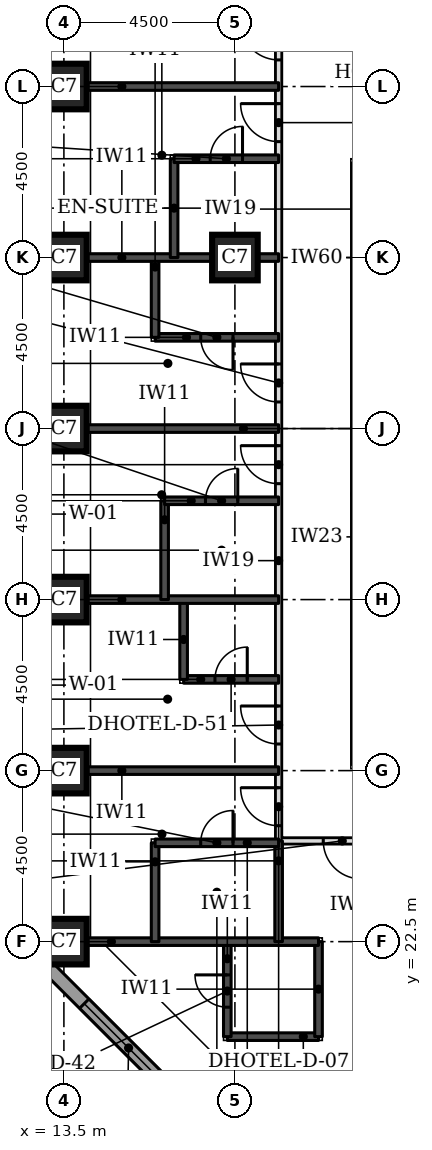
"""IFC4 building model, lengths in metres.
Left out: names, types, materials, properties, quantities, classifications, styles, units other than length and angle.
Written with IfcOpenShell. Run it as: python <this file> out.ifc"""

import sys

from ifc_helpers import new_model, si_unit, direction, frame, frame_2d, origin, origin_2d, place, context, subcontext, project, spatial, rectangle, extrude, element, fill, save


model = new_model("IFC4")
c1 = context("Model", 3, precision=1e-05, world=origin(), true_north=direction((0.0, 1.0)))
c2 = subcontext(c1, "Body", "Model", "MODEL_VIEW")
j1 = project(units=[si_unit("LENGTHUNIT", "METRE"), si_unit("PLANEANGLEUNIT", "RADIAN")], contexts=[c1])
p1 = place(None, origin())
s1 = spatial("IfcSite", under=j1, at=p1, CompositionType="ELEMENT")
p2 = place(p1, origin())
s2 = spatial("IfcBuilding", under=s1, at=p2, CompositionType="ELEMENT")
p3 = place(p2, frame((0.0, 0.0, 36.3)))
s3 = spatial("IfcBuildingStorey", under=s2, at=p3, CompositionType="ELEMENT", Elevation=36.3)
for number, where, z_axis, x_axis in (
    (1, (13.5, 22.5, 0.0), (0.0, 0.0, 1.0), (1.0, 0.0, 0.0)),
    (2, (13.5, 27.0, 0.0), (0.0, 0.0, 1.0), (1.0, 0.0, 0.0)),
    (3, (13.5, 31.5, 0.0), (0.0, 0.0, 1.0), (1.0, 0.0, 0.0)),
    (4, (13.5, 36.0, 0.0), (0.0, 0.0, 1.0), (1.0, 0.0, 0.0)),
    (5, (13.5, 40.5, 0.0), (0.0, 0.0, 1.0), (1.0, 0.0, 0.0)),
    (6, (18.0, 40.5, 0.0), (0.0, 0.0, 1.0), (1.0, 0.0, 0.0)),
    (7, (13.5, 45.0, 0.0), (0.0, 0.0, 1.0), (1.0, 0.0, 0.0)),
):
    element("IfcColumn", number, at=place(p3, frame(where, z_axis=z_axis, x_axis=x_axis)), inside=s3, PredefinedType="COLUMN", context=c2, shape_type="SweptSolid", body=[
        extrude(rectangle(XDim=1.2, YDim=1.2, at=origin_2d()), origin(), (0.0, 0.0, 1.0), 3.3),
    ])
p4 = place(p3, frame((12.674, 22.23, 0.0), z_axis=(0.0, 0.0, 1.0), x_axis=(0.707106781187, -0.707106781187, 0.0)))
e8 = element("IfcWall", 8, at=p4, inside=s3, PredefinedType="STANDARD", context=c2, shape_type="SweptSolid", body=[
    extrude(rectangle(XDim=7.151, YDim=0.35, at=frame_2d((3.576, 0.0))), origin(), (0.0, 0.0, 1.0), 3.055),
])
p5 = place(p4, frame((1.926, 0.0, 0.8)))
e9 = element("IfcOpeningElement", 9, at=p5, cuts=e8, PredefinedType="OPENING", context=c2, shape_type="SweptSolid", body=[
    extrude(rectangle(XDim=3.3, YDim=1.5, at=frame_2d((1.65, 0.75))), frame((0.0, 0.185, 0.0), z_axis=(0.0, -1.0, 0.0), x_axis=(1.0, 0.0, 0.0)), (0.0, 0.0, 1.0), 0.37),
])
p6 = place(p3, frame((19.15, 25.15, 0.0), z_axis=(0.0, 0.0, 1.0), x_axis=(1.0, 0.0, 0.0)))
e10 = element("IfcWall", 10, at=p6, inside=s3, PredefinedType="PARTITIONING", context=c2, shape_type="SweptSolid", body=[
    extrude(rectangle(XDim=32.35, YDim=0.15, at=frame_2d((16.175, 0.0))), origin(), (0.0, 0.0, 1.0), 3.08),
])
p7 = place(p6, frame((6.4, 0.0, 0.0)))
e11 = element("IfcOpeningElement", 11, at=p7, cuts=e10, PredefinedType="OPENING", context=c2, shape_type="SweptSolid", body=[
    extrude(rectangle(XDim=1.0, YDim=2.1, at=frame_2d((0.5, 1.05))), frame((0.0, 0.085, 0.0), z_axis=(0.0, -1.0, 0.0), x_axis=(1.0, 0.0, 0.0)), (0.0, 0.0, 1.0), 0.17),
])
p8 = place(p6, frame((10.5, 0.0, 0.0)))
e12 = element("IfcOpeningElement", 12, at=p8, cuts=e10, PredefinedType="OPENING", context=c2, shape_type="SweptSolid", body=[
    extrude(rectangle(XDim=1.0, YDim=2.1, at=frame_2d((0.5, 1.05))), frame((0.0, 0.085, 0.0), z_axis=(0.0, -1.0, 0.0), x_axis=(1.0, 0.0, 0.0)), (0.0, 0.0, 1.0), 0.17),
])
p9 = place(p6, frame((22.45, 0.0, 0.0)))
e13 = element("IfcOpeningElement", 13, at=p9, cuts=e10, PredefinedType="OPENING", context=c2, shape_type="SweptSolid", body=[
    extrude(rectangle(XDim=1.0, YDim=2.1, at=frame_2d((0.5, 1.05))), frame((0.0, 0.085, 0.0), z_axis=(0.0, -1.0, 0.0), x_axis=(1.0, 0.0, 0.0)), (0.0, 0.0, 1.0), 0.17),
])
p10 = place(p6, frame((26.55, 0.0, 0.0)))
e14 = element("IfcOpeningElement", 14, at=p10, cuts=e10, PredefinedType="OPENING", context=c2, shape_type="SweptSolid", body=[
    extrude(rectangle(XDim=1.0, YDim=2.1, at=frame_2d((0.5, 1.05))), frame((0.0, 0.085, 0.0), z_axis=(0.0, -1.0, 0.0), x_axis=(1.0, 0.0, 0.0)), (0.0, 0.0, 1.0), 0.17),
])
p11 = place(p6, frame((1.175, 0.0, 0.0)))
e15 = element("IfcOpeningElement", 15, at=p11, cuts=e10, PredefinedType="OPENING", context=c2, shape_type="SweptSolid", body=[
    extrude(rectangle(XDim=1.0, YDim=2.1, at=frame_2d((0.5, 1.05))), frame((0.0, 0.085, 0.0), z_axis=(0.0, -1.0, 0.0), x_axis=(1.0, 0.0, 0.0)), (0.0, 0.0, 1.0), 0.17),
])
p12 = place(p6, frame((30.85, 0.0, 0.0)))
e16 = element("IfcOpeningElement", 16, at=p12, cuts=e10, PredefinedType="OPENING", context=c2, shape_type="SweptSolid", body=[
    extrude(rectangle(XDim=1.0, YDim=2.1, at=frame_2d((0.5, 1.05))), frame((0.0, 0.085, 0.0), z_axis=(0.0, -1.0, 0.0), x_axis=(1.0, 0.0, 0.0)), (0.0, 0.0, 1.0), 0.17),
])
p13 = place(p3, frame((19.15, 25.15, 0.0), z_axis=(0.0, 0.0, 1.0), x_axis=(0.0, 1.0, 0.0)))
e17 = element("IfcWall", 17, at=p13, inside=s3, PredefinedType="PARTITIONING", context=c2, shape_type="SweptSolid", body=[
    extrude(rectangle(XDim=24.35, YDim=0.15, at=frame_2d((12.175, 0.0))), origin(), (0.0, 0.0, 1.0), 3.08),
])
p14 = place(p13, frame((0.4, 0.0, 0.0)))
e18 = element("IfcOpeningElement", 18, at=p14, cuts=e17, PredefinedType="OPENING", context=c2, shape_type="SweptSolid", body=[
    extrude(rectangle(XDim=1.0, YDim=2.1, at=frame_2d((0.5, 1.05))), frame((0.0, 0.085, 0.0), z_axis=(0.0, -1.0, 0.0), x_axis=(1.0, 0.0, 0.0)), (0.0, 0.0, 1.0), 0.17),
])
p15 = place(p13, frame((2.55, 0.0, 0.0)))
e19 = element("IfcOpeningElement", 19, at=p15, cuts=e17, PredefinedType="OPENING", context=c2, shape_type="SweptSolid", body=[
    extrude(rectangle(XDim=1.0, YDim=2.1, at=frame_2d((0.5, 1.05))), frame((0.0, 0.085, 0.0), z_axis=(0.0, -1.0, 0.0), x_axis=(1.0, 0.0, 0.0)), (0.0, 0.0, 1.0), 0.17),
])
p16 = place(p13, frame((9.4, 0.0, 0.0)))
e20 = element("IfcOpeningElement", 20, at=p16, cuts=e17, PredefinedType="OPENING", context=c2, shape_type="SweptSolid", body=[
    extrude(rectangle(XDim=1.0, YDim=2.1, at=frame_2d((0.5, 1.05))), frame((0.0, 0.085, 0.0), z_axis=(0.0, -1.0, 0.0), x_axis=(1.0, 0.0, 0.0)), (0.0, 0.0, 1.0), 0.17),
])
p17 = place(p13, frame((11.55, 0.0, 0.0)))
e21 = element("IfcOpeningElement", 21, at=p17, cuts=e17, PredefinedType="OPENING", context=c2, shape_type="SweptSolid", body=[
    extrude(rectangle(XDim=1.0, YDim=2.1, at=frame_2d((0.5, 1.05))), frame((0.0, 0.085, 0.0), z_axis=(0.0, -1.0, 0.0), x_axis=(1.0, 0.0, 0.0)), (0.0, 0.0, 1.0), 0.17),
])
p18 = place(p13, frame((18.4, 0.0, 0.0)))
e22 = element("IfcOpeningElement", 22, at=p18, cuts=e17, PredefinedType="OPENING", context=c2, shape_type="SweptSolid", body=[
    extrude(rectangle(XDim=1.0, YDim=2.1, at=frame_2d((0.5, 1.05))), frame((0.0, 0.085, 0.0), z_axis=(0.0, -1.0, 0.0), x_axis=(1.0, 0.0, 0.0)), (0.0, 0.0, 1.0), 0.17),
])
p19 = place(p13, frame((20.55, 0.0, 0.0)))
e23 = element("IfcOpeningElement", 23, at=p19, cuts=e17, PredefinedType="OPENING", context=c2, shape_type="SweptSolid", body=[
    extrude(rectangle(XDim=1.0, YDim=2.1, at=frame_2d((0.5, 1.05))), frame((0.0, 0.085, 0.0), z_axis=(0.0, -1.0, 0.0), x_axis=(1.0, 0.0, 0.0)), (0.0, 0.0, 1.0), 0.17),
])
p20 = place(p3, frame((21.15, 27.15, 0.0), z_axis=(0.0, 0.0, 1.0), x_axis=(0.0, 1.0, 0.0)))
e24 = element("IfcWall", 24, at=p20, inside=s3, PredefinedType="PARTITIONING", context=c2, shape_type="SweptSolid", body=[
    extrude(rectangle(XDim=15.85, YDim=0.15, at=frame_2d((7.925, 0.0))), origin(), (0.0, 0.0, 1.0), 3.08),
])
p21 = place(p20, frame((2.55, 0.0, 0.0)))
e25 = element("IfcOpeningElement", 25, at=p21, cuts=e24, PredefinedType="OPENING", context=c2, shape_type="SweptSolid", body=[
    extrude(rectangle(XDim=0.9, YDim=2.1, at=frame_2d((0.45, 1.05))), frame((0.0, 0.085, 0.0), z_axis=(0.0, -1.0, 0.0), x_axis=(1.0, 0.0, 0.0)), (0.0, 0.0, 1.0), 0.17),
])
p22 = place(p20, frame((9.225, 0.0, 0.0)))
e26 = element("IfcOpeningElement", 26, at=p22, cuts=e24, PredefinedType="OPENING", context=c2, shape_type="SweptSolid", body=[
    extrude(rectangle(XDim=0.9, YDim=2.1, at=frame_2d((0.45, 1.05))), frame((0.0, 0.085, 0.0), z_axis=(0.0, -1.0, 0.0), x_axis=(1.0, 0.0, 0.0)), (0.0, 0.0, 1.0), 0.17),
])
p23 = place(p3, frame((17.8, 20.0, 0.0), z_axis=(0.0, 0.0, 1.0), x_axis=(1.0, 0.0, 0.0)))
e27 = element("IfcWall", 27, at=p23, inside=s3, PredefinedType="SOLIDWALL", context=c2, shape_type="SweptSolid", body=[
    extrude(rectangle(XDim=2.4, YDim=0.2, at=frame_2d((1.2, 0.0))), origin(), (0.0, 0.0, 1.0), 3.08),
])
p24 = place(p3, frame((17.8, 20.0, 0.0), z_axis=(0.0, 0.0, 1.0), x_axis=(0.0, 1.0, 0.0)))
e28 = element("IfcWall", 28, at=p24, inside=s3, PredefinedType="SOLIDWALL", context=c2, shape_type="SweptSolid", body=[
    extrude(rectangle(XDim=2.5, YDim=0.2, at=frame_2d((1.25, 0.0))), origin(), (0.0, 0.0, 1.0), 3.08),
])
p25 = place(p24, frame((0.775, 0.0, 0.0)))
e29 = element("IfcOpeningElement", 29, at=p25, cuts=e28, PredefinedType="OPENING", context=c2, shape_type="SweptSolid", body=[
    extrude(rectangle(XDim=0.85, YDim=2.1, at=frame_2d((0.425, 1.05))), frame((0.0, 0.11, 0.0), z_axis=(0.0, -1.0, 0.0), x_axis=(1.0, 0.0, 0.0)), (0.0, 0.0, 1.0), 0.22),
])
p26 = place(p3, frame((20.2, 20.0, 0.0), z_axis=(0.0, 0.0, 1.0), x_axis=(0.0, 1.0, 0.0)))
e30 = element("IfcWall", 30, at=p26, inside=s3, PredefinedType="SOLIDWALL", context=c2, shape_type="SweptSolid", body=[
    extrude(rectangle(XDim=2.5, YDim=0.2, at=frame_2d((1.25, 0.0))), origin(), (0.0, 0.0, 1.0), 3.08),
])
p27 = place(p3, frame((14.1, 22.5, 0.0), z_axis=(0.0, 0.0, 1.0), x_axis=(1.0, 0.0, 0.0)))
e31 = element("IfcWall", 31, at=p27, inside=s3, PredefinedType="SOLIDWALL", context=c2, shape_type="SweptSolid", body=[
    extrude(rectangle(XDim=6.1, YDim=0.2, at=frame_2d((3.05, 0.0))), origin(), (0.0, 0.0, 1.0), 3.08),
])
p28 = place(p3, frame((15.9, 22.5, 0.0), z_axis=(0.0, 0.0, 1.0), x_axis=(0.0, 1.0, 0.0)))
e32 = element("IfcWall", 32, at=p28, inside=s3, PredefinedType="SOLIDWALL", context=c2, shape_type="SweptSolid", body=[
    extrude(rectangle(XDim=2.6, YDim=0.2, at=frame_2d((1.3, 0.0))), origin(), (0.0, 0.0, 1.0), 3.08),
])
p29 = place(p3, frame((19.15, 22.5, 0.0), z_axis=(0.0, 0.0, 1.0), x_axis=(0.0, 1.0, 0.0)))
e33 = element("IfcWall", 33, at=p29, inside=s3, PredefinedType="SOLIDWALL", context=c2, shape_type="SweptSolid", body=[
    extrude(rectangle(XDim=2.65, YDim=0.2, at=frame_2d((1.325, 0.0))), origin(), (0.0, 0.0, 1.0), 3.08),
])
p30 = place(p3, frame((15.9, 25.1, 0.0), z_axis=(0.0, 0.0, 1.0), x_axis=(1.0, 0.0, 0.0)))
e34 = element("IfcWall", 34, at=p30, inside=s3, PredefinedType="SOLIDWALL", context=c2, shape_type="SweptSolid", body=[
    extrude(rectangle(XDim=3.25, YDim=0.2, at=frame_2d((1.625, 0.0))), origin(), (0.0, 0.0, 1.0), 3.08),
])
p31 = place(p30, frame((1.2, 0.0, 0.0)))
e35 = element("IfcOpeningElement", 35, at=p31, cuts=e34, PredefinedType="OPENING", context=c2, shape_type="SweptSolid", body=[
    extrude(rectangle(XDim=0.85, YDim=2.1, at=frame_2d((0.425, 1.05))), frame((0.0, 0.11, 0.0), z_axis=(0.0, -1.0, 0.0), x_axis=(1.0, 0.0, 0.0)), (0.0, 0.0, 1.0), 0.22),
])
p32 = place(p3, frame((14.1, 27.0, 0.0), z_axis=(0.0, 0.0, 1.0), x_axis=(1.0, 0.0, 0.0)))
e36 = element("IfcWall", 36, at=p32, inside=s3, PredefinedType="SOLIDWALL", context=c2, shape_type="SweptSolid", body=[
    extrude(rectangle(XDim=5.05, YDim=0.2, at=frame_2d((2.525, 0.0))), origin(), (0.0, 0.0, 1.0), 3.08),
])
p33 = place(p3, frame((16.65, 29.4, 0.0), z_axis=(0.0, 0.0, 1.0), x_axis=(1.0, 0.0, 0.0)))
e37 = element("IfcWall", 37, at=p33, inside=s3, PredefinedType="SOLIDWALL", context=c2, shape_type="SweptSolid", body=[
    extrude(rectangle(XDim=2.5, YDim=0.2, at=frame_2d((1.25, 0.0))), origin(), (0.0, 0.0, 1.0), 3.08),
])
p34 = place(p33, frame((0.825, 0.0, 0.0)))
e38 = element("IfcOpeningElement", 38, at=p34, cuts=e37, PredefinedType="OPENING", context=c2, shape_type="SweptSolid", body=[
    extrude(rectangle(XDim=0.85, YDim=2.1, at=frame_2d((0.425, 1.05))), frame((0.0, 0.11, 0.0), z_axis=(0.0, -1.0, 0.0), x_axis=(1.0, 0.0, 0.0)), (0.0, 0.0, 1.0), 0.22),
])
p35 = place(p3, frame((16.65, 29.4, 0.0), z_axis=(0.0, 0.0, 1.0), x_axis=(0.0, 1.0, 0.0)))
e39 = element("IfcWall", 39, at=p35, inside=s3, PredefinedType="SOLIDWALL", context=c2, shape_type="SweptSolid", body=[
    extrude(rectangle(XDim=2.1, YDim=0.2, at=frame_2d((1.05, 0.0))), origin(), (0.0, 0.0, 1.0), 3.08),
])
p36 = place(p3, frame((14.1, 31.5, 0.0), z_axis=(0.0, 0.0, 1.0), x_axis=(1.0, 0.0, 0.0)))
e40 = element("IfcWall", 40, at=p36, inside=s3, PredefinedType="SOLIDWALL", context=c2, shape_type="SweptSolid", body=[
    extrude(rectangle(XDim=5.05, YDim=0.2, at=frame_2d((2.525, 0.0))), origin(), (0.0, 0.0, 1.0), 3.08),
])
p37 = place(p3, frame((16.15, 31.5, 0.0), z_axis=(0.0, 0.0, 1.0), x_axis=(0.0, 1.0, 0.0)))
e41 = element("IfcWall", 41, at=p37, inside=s3, PredefinedType="SOLIDWALL", context=c2, shape_type="SweptSolid", body=[
    extrude(rectangle(XDim=2.6, YDim=0.2, at=frame_2d((1.3, 0.0))), origin(), (0.0, 0.0, 1.0), 3.08),
])
p38 = place(p3, frame((16.15, 34.1, 0.0), z_axis=(0.0, 0.0, 1.0), x_axis=(1.0, 0.0, 0.0)))
e42 = element("IfcWall", 42, at=p38, inside=s3, PredefinedType="SOLIDWALL", context=c2, shape_type="SweptSolid", body=[
    extrude(rectangle(XDim=3.0, YDim=0.2, at=frame_2d((1.5, 0.0))), origin(), (0.0, 0.0, 1.0), 3.08),
])
p39 = place(p38, frame((1.075, 0.0, 0.0)))
e43 = element("IfcOpeningElement", 43, at=p39, cuts=e42, PredefinedType="OPENING", context=c2, shape_type="SweptSolid", body=[
    extrude(rectangle(XDim=0.85, YDim=2.1, at=frame_2d((0.425, 1.05))), frame((0.0, 0.11, 0.0), z_axis=(0.0, -1.0, 0.0), x_axis=(1.0, 0.0, 0.0)), (0.0, 0.0, 1.0), 0.22),
])
p40 = place(p3, frame((14.1, 36.0, 0.0), z_axis=(0.0, 0.0, 1.0), x_axis=(1.0, 0.0, 0.0)))
e44 = element("IfcWall", 44, at=p40, inside=s3, PredefinedType="SOLIDWALL", context=c2, shape_type="SweptSolid", body=[
    extrude(rectangle(XDim=5.05, YDim=0.2, at=frame_2d((2.525, 0.0))), origin(), (0.0, 0.0, 1.0), 3.08),
])
p41 = place(p3, frame((15.9, 38.4, 0.0), z_axis=(0.0, 0.0, 1.0), x_axis=(1.0, 0.0, 0.0)))
e45 = element("IfcWall", 45, at=p41, inside=s3, PredefinedType="SOLIDWALL", context=c2, shape_type="SweptSolid", body=[
    extrude(rectangle(XDim=3.25, YDim=0.2, at=frame_2d((1.625, 0.0))), origin(), (0.0, 0.0, 1.0), 3.08),
])
p42 = place(p41, frame((1.2, 0.0, 0.0)))
e46 = element("IfcOpeningElement", 46, at=p42, cuts=e45, PredefinedType="OPENING", context=c2, shape_type="SweptSolid", body=[
    extrude(rectangle(XDim=0.85, YDim=2.1, at=frame_2d((0.425, 1.05))), frame((0.0, 0.11, 0.0), z_axis=(0.0, -1.0, 0.0), x_axis=(1.0, 0.0, 0.0)), (0.0, 0.0, 1.0), 0.22),
])
p43 = place(p3, frame((15.9, 38.4, 0.0), z_axis=(0.0, 0.0, 1.0), x_axis=(0.0, 1.0, 0.0)))
e47 = element("IfcWall", 47, at=p43, inside=s3, PredefinedType="SOLIDWALL", context=c2, shape_type="SweptSolid", body=[
    extrude(rectangle(XDim=2.1, YDim=0.2, at=frame_2d((1.05, 0.0))), origin(), (0.0, 0.0, 1.0), 3.08),
])
p44 = place(p3, frame((14.1, 40.5, 0.0), z_axis=(0.0, 0.0, 1.0), x_axis=(1.0, 0.0, 0.0)))
e48 = element("IfcWall", 48, at=p44, inside=s3, PredefinedType="SOLIDWALL", context=c2, shape_type="SweptSolid", body=[
    extrude(rectangle(XDim=5.05, YDim=0.2, at=frame_2d((2.525, 0.0))), origin(), (0.0, 0.0, 1.0), 3.08),
])
p45 = place(p3, frame((16.4, 40.5, 0.0), z_axis=(0.0, 0.0, 1.0), x_axis=(0.0, 1.0, 0.0)))
e49 = element("IfcWall", 49, at=p45, inside=s3, PredefinedType="SOLIDWALL", context=c2, shape_type="SweptSolid", body=[
    extrude(rectangle(XDim=2.6, YDim=0.2, at=frame_2d((1.3, 0.0))), origin(), (0.0, 0.0, 1.0), 3.08),
])
p46 = place(p3, frame((16.4, 43.1, 0.0), z_axis=(0.0, 0.0, 1.0), x_axis=(1.0, 0.0, 0.0)))
e50 = element("IfcWall", 50, at=p46, inside=s3, PredefinedType="SOLIDWALL", context=c2, shape_type="SweptSolid", body=[
    extrude(rectangle(XDim=2.75, YDim=0.2, at=frame_2d((1.375, 0.0))), origin(), (0.0, 0.0, 1.0), 3.08),
])
p47 = place(p46, frame((0.95, 0.0, 0.0)))
e51 = element("IfcOpeningElement", 51, at=p47, cuts=e50, PredefinedType="OPENING", context=c2, shape_type="SweptSolid", body=[
    extrude(rectangle(XDim=0.85, YDim=2.1, at=frame_2d((0.425, 1.05))), frame((0.0, 0.11, 0.0), z_axis=(0.0, -1.0, 0.0), x_axis=(1.0, 0.0, 0.0)), (0.0, 0.0, 1.0), 0.22),
])
p48 = place(p3, frame((14.1, 45.0, 0.0), z_axis=(0.0, 0.0, 1.0), x_axis=(1.0, 0.0, 0.0)))
e52 = element("IfcWall", 52, at=p48, inside=s3, PredefinedType="SOLIDWALL", context=c2, shape_type="SweptSolid", body=[
    extrude(rectangle(XDim=5.05, YDim=0.2, at=frame_2d((2.525, 0.0))), origin(), (0.0, 0.0, 1.0), 3.08),
])
p49 = place(p5, origin())
e53 = element("IfcWindow", 53, at=p49, inside=s3, PartitioningType="SINGLE_PANEL", PredefinedType="WINDOW", context=c2, shape_type="SweptSolid", body=[
    extrude(rectangle(XDim=3.3, YDim=1.5, at=frame_2d((1.65, 0.75))), frame((0.0, 0.085, 0.0), z_axis=(0.0, -1.0, 0.0), x_axis=(1.0, 0.0, 0.0)), (0.0, 0.0, 1.0), 0.06),
])
fill(e9, e53)
p50 = place(p14, origin())
e54 = element("IfcDoor", 54, at=p50, inside=s3, OperationType="SINGLE_SWING_RIGHT", PredefinedType="DOOR", context=c2, shape_type="SweptSolid", body=[
    extrude(rectangle(XDim=1.0, YDim=2.1, at=frame_2d((0.5, 1.05))), frame((0.0, 0.025, 0.0), z_axis=(0.0, -1.0, 0.0), x_axis=(1.0, 0.0, 0.0)), (0.0, 0.0, 1.0), 0.05),
])
fill(e18, e54)
p51 = place(p31, origin())
e55 = element("IfcDoor", 55, at=p51, inside=s3, OperationType="SINGLE_SWING_RIGHT", PredefinedType="DOOR", context=c2, shape_type="SweptSolid", body=[
    extrude(rectangle(XDim=0.85, YDim=2.1, at=frame_2d((0.425, 1.05))), frame((0.0, 0.025, 0.0), z_axis=(0.0, -1.0, 0.0), x_axis=(1.0, 0.0, 0.0)), (0.0, 0.0, 1.0), 0.05),
])
fill(e35, e55)
p52 = place(p15, origin())
e56 = element("IfcDoor", 56, at=p52, inside=s3, OperationType="SINGLE_SWING_RIGHT", PredefinedType="DOOR", context=c2, shape_type="SweptSolid", body=[
    extrude(rectangle(XDim=1.0, YDim=2.1, at=frame_2d((0.5, 1.05))), frame((0.0, 0.025, 0.0), z_axis=(0.0, -1.0, 0.0), x_axis=(1.0, 0.0, 0.0)), (0.0, 0.0, 1.0), 0.05),
])
fill(e19, e56)
p53 = place(p34, origin())
e57 = element("IfcDoor", 57, at=p53, inside=s3, OperationType="SINGLE_SWING_RIGHT", PredefinedType="DOOR", context=c2, shape_type="SweptSolid", body=[
    extrude(rectangle(XDim=0.85, YDim=2.1, at=frame_2d((0.425, 1.05))), frame((0.0, 0.025, 0.0), z_axis=(0.0, -1.0, 0.0), x_axis=(1.0, 0.0, 0.0)), (0.0, 0.0, 1.0), 0.05),
])
fill(e38, e57)
p54 = place(p16, origin())
e58 = element("IfcDoor", 58, at=p54, inside=s3, OperationType="SINGLE_SWING_RIGHT", PredefinedType="DOOR", context=c2, shape_type="SweptSolid", body=[
    extrude(rectangle(XDim=1.0, YDim=2.1, at=frame_2d((0.5, 1.05))), frame((0.0, 0.025, 0.0), z_axis=(0.0, -1.0, 0.0), x_axis=(1.0, 0.0, 0.0)), (0.0, 0.0, 1.0), 0.05),
])
fill(e20, e58)
p55 = place(p39, origin())
e59 = element("IfcDoor", 59, at=p55, inside=s3, OperationType="SINGLE_SWING_RIGHT", PredefinedType="DOOR", context=c2, shape_type="SweptSolid", body=[
    extrude(rectangle(XDim=0.85, YDim=2.1, at=frame_2d((0.425, 1.05))), frame((0.0, 0.025, 0.0), z_axis=(0.0, -1.0, 0.0), x_axis=(1.0, 0.0, 0.0)), (0.0, 0.0, 1.0), 0.05),
])
fill(e43, e59)
p56 = place(p17, origin())
e60 = element("IfcDoor", 60, at=p56, inside=s3, OperationType="SINGLE_SWING_RIGHT", PredefinedType="DOOR", context=c2, shape_type="SweptSolid", body=[
    extrude(rectangle(XDim=1.0, YDim=2.1, at=frame_2d((0.5, 1.05))), frame((0.0, 0.025, 0.0), z_axis=(0.0, -1.0, 0.0), x_axis=(1.0, 0.0, 0.0)), (0.0, 0.0, 1.0), 0.05),
])
fill(e21, e60)
p57 = place(p42, frame((0.85, 0.0, 0.0), z_axis=(0.0, 0.0, 1.0), x_axis=(-1.0, 0.0, 0.0)))
e61 = element("IfcDoor", 61, at=p57, inside=s3, OperationType="SINGLE_SWING_LEFT", PredefinedType="DOOR", context=c2, shape_type="SweptSolid", body=[
    extrude(rectangle(XDim=0.85, YDim=2.1, at=frame_2d((0.425, 1.05))), frame((0.0, 0.025, 0.0), z_axis=(0.0, -1.0, 0.0), x_axis=(1.0, 0.0, 0.0)), (0.0, 0.0, 1.0), 0.05),
])
fill(e46, e61)
p58 = place(p18, origin())
e62 = element("IfcDoor", 62, at=p58, inside=s3, OperationType="SINGLE_SWING_RIGHT", PredefinedType="DOOR", context=c2, shape_type="SweptSolid", body=[
    extrude(rectangle(XDim=1.0, YDim=2.1, at=frame_2d((0.5, 1.05))), frame((0.0, 0.025, 0.0), z_axis=(0.0, -1.0, 0.0), x_axis=(1.0, 0.0, 0.0)), (0.0, 0.0, 1.0), 0.05),
])
fill(e22, e62)
p59 = place(p47, origin())
e63 = element("IfcDoor", 63, at=p59, inside=s3, OperationType="SINGLE_SWING_RIGHT", PredefinedType="DOOR", context=c2, shape_type="SweptSolid", body=[
    extrude(rectangle(XDim=0.85, YDim=2.1, at=frame_2d((0.425, 1.05))), frame((0.0, 0.025, 0.0), z_axis=(0.0, -1.0, 0.0), x_axis=(1.0, 0.0, 0.0)), (0.0, 0.0, 1.0), 0.05),
])
fill(e51, e63)
p60 = place(p19, origin())
e64 = element("IfcDoor", 64, at=p60, inside=s3, OperationType="SINGLE_SWING_RIGHT", PredefinedType="DOOR", context=c2, shape_type="SweptSolid", body=[
    extrude(rectangle(XDim=1.0, YDim=2.1, at=frame_2d((0.5, 1.05))), frame((0.0, 0.025, 0.0), z_axis=(0.0, -1.0, 0.0), x_axis=(1.0, 0.0, 0.0)), (0.0, 0.0, 1.0), 0.05),
])
fill(e23, e64)
p61 = place(p11, frame((1.0, 0.0, 0.0), z_axis=(0.0, 0.0, 1.0), x_axis=(-1.0, 0.0, 0.0)))
e65 = element("IfcDoor", 65, at=p61, inside=s3, OperationType="SINGLE_SWING_LEFT", PredefinedType="DOOR", context=c2, shape_type="SweptSolid", body=[
    extrude(rectangle(XDim=1.0, YDim=2.1, at=frame_2d((0.5, 1.05))), frame((0.0, 0.025, 0.0), z_axis=(0.0, -1.0, 0.0), x_axis=(1.0, 0.0, 0.0)), (0.0, 0.0, 1.0), 0.05),
])
fill(e15, e65)
p62 = place(p25, origin())
e66 = element("IfcDoor", 66, at=p62, inside=s3, OperationType="SINGLE_SWING_RIGHT", PredefinedType="DOOR", context=c2, shape_type="SweptSolid", body=[
    extrude(rectangle(XDim=0.85, YDim=2.1, at=frame_2d((0.425, 1.05))), frame((0.0, 0.025, 0.0), z_axis=(0.0, -1.0, 0.0), x_axis=(1.0, 0.0, 0.0)), (0.0, 0.0, 1.0), 0.05),
])
fill(e29, e66)
save(model, sys.argv[1])
